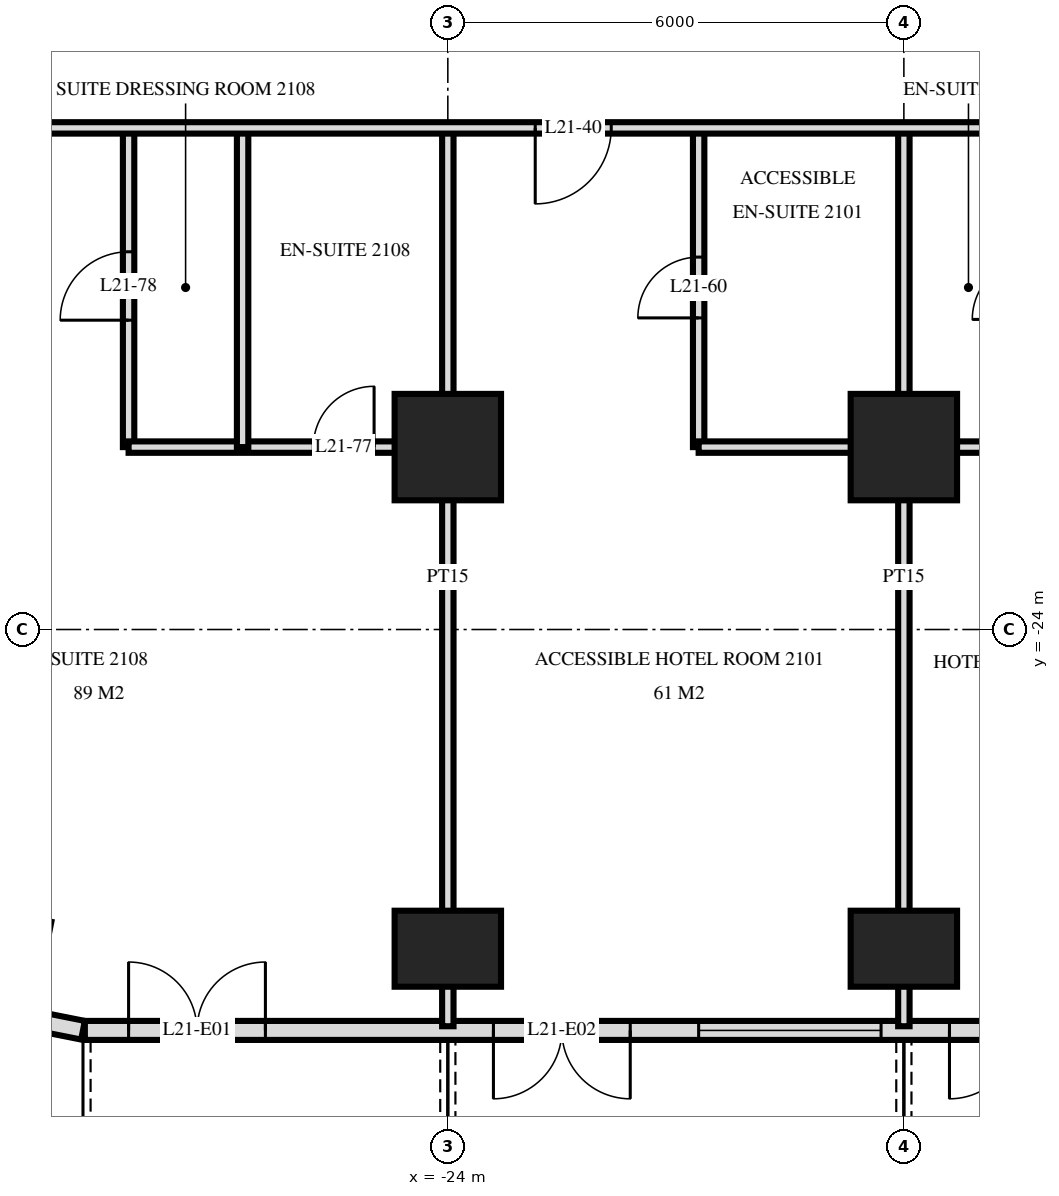
"""IFC4 building model, lengths in metres.
Left out: names, types, materials, properties, quantities, classifications, styles, units other than length and angle.
Written with IfcOpenShell. Run it as: python <this file> out.ifc"""

import sys

from ifc_helpers import new_model, si_unit, direction, frame, frame_2d, origin, origin_2d, place, context, subcontext, project, spatial, rectangle, extrude, element, fill, save


model = new_model("IFC4")
c1 = context("Model", 3, precision=1e-05, world=origin(), true_north=direction((0.0, 1.0)))
c2 = subcontext(c1, "Body", "Model", "MODEL_VIEW")
j1 = project(units=[si_unit("LENGTHUNIT", "METRE"), si_unit("PLANEANGLEUNIT", "RADIAN")], contexts=[c1])
p1 = place(None, origin())
s1 = spatial("IfcSite", under=j1, at=p1, CompositionType="ELEMENT")
p2 = place(p1, origin())
s2 = spatial("IfcBuilding", under=s1, at=p2, CompositionType="ELEMENT")
p3 = place(p2, frame((0.0, 0.0, 85.2)))
s3 = spatial("IfcBuildingStorey", under=s2, at=p3, CompositionType="ELEMENT", Elevation=85.2)
p4 = place(p3, frame((-24.0, -28.2, 0.0), z_axis=(0.0, 0.0, 1.0), x_axis=(1.0, 0.0, 0.0)))
e1 = element("IfcColumn", 1, at=p4, inside=s3, PredefinedType="COLUMN", context=c2, shape_type="SweptSolid", body=[
    extrude(rectangle(XDim=1.4, YDim=1.0, at=origin_2d()), origin(), (0.0, 0.0, 1.0), 3.6),
])
p5 = place(p3, frame((-24.0, -21.6, 0.0), z_axis=(0.0, 0.0, 1.0), x_axis=(1.0, 0.0, 0.0)))
e2 = element("IfcColumn", 2, at=p5, inside=s3, PredefinedType="COLUMN", context=c2, shape_type="SweptSolid", body=[
    extrude(rectangle(XDim=1.4, YDim=1.4, at=origin_2d()), origin(), (0.0, 0.0, 1.0), 3.6),
])
p6 = place(p3, frame((-18.0, -28.2, 0.0), z_axis=(0.0, 0.0, 1.0), x_axis=(1.0, 0.0, 0.0)))
e3 = element("IfcColumn", 3, at=p6, inside=s3, PredefinedType="COLUMN", context=c2, shape_type="SweptSolid", body=[
    extrude(rectangle(XDim=1.4, YDim=1.0, at=origin_2d()), origin(), (0.0, 0.0, 1.0), 3.6),
])
p7 = place(p3, frame((-18.0, -21.6, 0.0), z_axis=(0.0, 0.0, 1.0), x_axis=(1.0, 0.0, 0.0)))
e4 = element("IfcColumn", 4, at=p7, inside=s3, PredefinedType="COLUMN", context=c2, shape_type="SweptSolid", body=[
    extrude(rectangle(XDim=1.4, YDim=1.4, at=origin_2d()), origin(), (0.0, 0.0, 1.0), 3.6),
])
p8 = place(p3, frame((-30.449, -28.945, 0.0), z_axis=(0.0, 0.0, 1.0), x_axis=(0.980775640221, -0.19513878023, 0.0)))
e5 = element("IfcWall", 5, at=p8, inside=s3, PredefinedType="SOLIDWALL", context=c2, shape_type="SweptSolid", body=[
    extrude(rectangle(XDim=1.681, YDim=0.25, at=frame_2d((0.841, 0.0))), origin(), (0.0, 0.0, 1.0), 3.32),
])
p9 = place(p3, frame((-28.775, -29.275, 0.0), z_axis=(0.0, 0.0, 1.0), x_axis=(1.0, 0.0, 0.0)))
e6 = element("IfcWall", 6, at=p9, inside=s3, PredefinedType="SOLIDWALL", context=c2, shape_type="SweptSolid", body=[
    extrude(rectangle(XDim=57.551, YDim=0.25, at=frame_2d((28.775, 0.0))), origin(), (0.0, 0.0, 1.0), 3.32),
])
p10 = place(p9, frame((0.575, 0.0, 0.0)))
e7 = element("IfcOpeningElement", 7, at=p10, cuts=e6, PredefinedType="OPENING", context=c2, shape_type="SweptSolid", body=[
    extrude(rectangle(XDim=1.8, YDim=2.4, at=frame_2d((0.9, 1.2))), frame((0.0, 0.135, 0.0), z_axis=(0.0, -1.0, 0.0), x_axis=(1.0, 0.0, 0.0)), (0.0, 0.0, 1.0), 0.27),
])
p11 = place(p9, frame((5.375, 0.0, 0.0)))
e8 = element("IfcOpeningElement", 8, at=p11, cuts=e6, PredefinedType="OPENING", context=c2, shape_type="SweptSolid", body=[
    extrude(rectangle(XDim=1.8, YDim=2.4, at=frame_2d((0.9, 1.2))), frame((0.0, 0.135, 0.0), z_axis=(0.0, -1.0, 0.0), x_axis=(1.0, 0.0, 0.0)), (0.0, 0.0, 1.0), 0.27),
])
p12 = place(p9, frame((8.075, 0.0, 0.3)))
e9 = element("IfcOpeningElement", 9, at=p12, cuts=e6, PredefinedType="OPENING", context=c2, shape_type="SweptSolid", body=[
    extrude(rectangle(XDim=2.4, YDim=2.1, at=frame_2d((1.2, 1.05))), frame((0.0, 0.135, 0.0), z_axis=(0.0, -1.0, 0.0), x_axis=(1.0, 0.0, 0.0)), (0.0, 0.0, 1.0), 0.27),
])
p13 = place(p9, frame((11.375, 0.0, 0.0)))
e10 = element("IfcOpeningElement", 10, at=p13, cuts=e6, PredefinedType="OPENING", context=c2, shape_type="SweptSolid", body=[
    extrude(rectangle(XDim=1.8, YDim=2.4, at=frame_2d((0.9, 1.2))), frame((0.0, 0.135, 0.0), z_axis=(0.0, -1.0, 0.0), x_axis=(1.0, 0.0, 0.0)), (0.0, 0.0, 1.0), 0.27),
])
p14 = place(p9, frame((14.075, 0.0, 0.3)))
e11 = element("IfcOpeningElement", 11, at=p14, cuts=e6, PredefinedType="OPENING", context=c2, shape_type="SweptSolid", body=[
    extrude(rectangle(XDim=2.4, YDim=2.1, at=frame_2d((1.2, 1.05))), frame((0.0, 0.135, 0.0), z_axis=(0.0, -1.0, 0.0), x_axis=(1.0, 0.0, 0.0)), (0.0, 0.0, 1.0), 0.27),
])
p15 = place(p9, frame((17.075, 0.0, 0.3)))
e12 = element("IfcOpeningElement", 12, at=p15, cuts=e6, PredefinedType="OPENING", context=c2, shape_type="SweptSolid", body=[
    extrude(rectangle(XDim=2.4, YDim=2.1, at=frame_2d((1.2, 1.05))), frame((0.0, 0.135, 0.0), z_axis=(0.0, -1.0, 0.0), x_axis=(1.0, 0.0, 0.0)), (0.0, 0.0, 1.0), 0.27),
])
p16 = place(p9, frame((20.375, 0.0, 0.0)))
e13 = element("IfcOpeningElement", 13, at=p16, cuts=e6, PredefinedType="OPENING", context=c2, shape_type="SweptSolid", body=[
    extrude(rectangle(XDim=1.8, YDim=2.4, at=frame_2d((0.9, 1.2))), frame((0.0, 0.135, 0.0), z_axis=(0.0, -1.0, 0.0), x_axis=(1.0, 0.0, 0.0)), (0.0, 0.0, 1.0), 0.27),
])
p17 = place(p9, frame((23.375, 0.0, 0.0)))
e14 = element("IfcOpeningElement", 14, at=p17, cuts=e6, PredefinedType="OPENING", context=c2, shape_type="SweptSolid", body=[
    extrude(rectangle(XDim=1.8, YDim=2.4, at=frame_2d((0.9, 1.2))), frame((0.0, 0.135, 0.0), z_axis=(0.0, -1.0, 0.0), x_axis=(1.0, 0.0, 0.0)), (0.0, 0.0, 1.0), 0.27),
])
p18 = place(p9, frame((26.075, 0.0, 0.3)))
e15 = element("IfcOpeningElement", 15, at=p18, cuts=e6, PredefinedType="OPENING", context=c2, shape_type="SweptSolid", body=[
    extrude(rectangle(XDim=2.4, YDim=2.1, at=frame_2d((1.2, 1.05))), frame((0.0, 0.135, 0.0), z_axis=(0.0, -1.0, 0.0), x_axis=(1.0, 0.0, 0.0)), (0.0, 0.0, 1.0), 0.27),
])
p19 = place(p9, frame((29.375, 0.0, 0.0)))
e16 = element("IfcOpeningElement", 16, at=p19, cuts=e6, PredefinedType="OPENING", context=c2, shape_type="SweptSolid", body=[
    extrude(rectangle(XDim=1.8, YDim=2.4, at=frame_2d((0.9, 1.2))), frame((0.0, 0.135, 0.0), z_axis=(0.0, -1.0, 0.0), x_axis=(1.0, 0.0, 0.0)), (0.0, 0.0, 1.0), 0.27),
])
p20 = place(p9, frame((32.075, 0.0, 0.3)))
e17 = element("IfcOpeningElement", 17, at=p20, cuts=e6, PredefinedType="OPENING", context=c2, shape_type="SweptSolid", body=[
    extrude(rectangle(XDim=2.4, YDim=2.1, at=frame_2d((1.2, 1.05))), frame((0.0, 0.135, 0.0), z_axis=(0.0, -1.0, 0.0), x_axis=(1.0, 0.0, 0.0)), (0.0, 0.0, 1.0), 0.27),
])
p21 = place(p9, frame((35.375, 0.0, 0.0)))
e18 = element("IfcOpeningElement", 18, at=p21, cuts=e6, PredefinedType="OPENING", context=c2, shape_type="SweptSolid", body=[
    extrude(rectangle(XDim=1.8, YDim=2.4, at=frame_2d((0.9, 1.2))), frame((0.0, 0.135, 0.0), z_axis=(0.0, -1.0, 0.0), x_axis=(1.0, 0.0, 0.0)), (0.0, 0.0, 1.0), 0.27),
])
p22 = place(p9, frame((38.075, 0.0, 0.3)))
e19 = element("IfcOpeningElement", 19, at=p22, cuts=e6, PredefinedType="OPENING", context=c2, shape_type="SweptSolid", body=[
    extrude(rectangle(XDim=2.4, YDim=2.1, at=frame_2d((1.2, 1.05))), frame((0.0, 0.135, 0.0), z_axis=(0.0, -1.0, 0.0), x_axis=(1.0, 0.0, 0.0)), (0.0, 0.0, 1.0), 0.27),
])
p23 = place(p9, frame((41.375, 0.0, 0.0)))
e20 = element("IfcOpeningElement", 20, at=p23, cuts=e6, PredefinedType="OPENING", context=c2, shape_type="SweptSolid", body=[
    extrude(rectangle(XDim=1.8, YDim=2.4, at=frame_2d((0.9, 1.2))), frame((0.0, 0.135, 0.0), z_axis=(0.0, -1.0, 0.0), x_axis=(1.0, 0.0, 0.0)), (0.0, 0.0, 1.0), 0.27),
])
p24 = place(p9, frame((44.075, 0.0, 0.3)))
e21 = element("IfcOpeningElement", 21, at=p24, cuts=e6, PredefinedType="OPENING", context=c2, shape_type="SweptSolid", body=[
    extrude(rectangle(XDim=2.4, YDim=2.1, at=frame_2d((1.2, 1.05))), frame((0.0, 0.135, 0.0), z_axis=(0.0, -1.0, 0.0), x_axis=(1.0, 0.0, 0.0)), (0.0, 0.0, 1.0), 0.27),
])
p25 = place(p9, frame((47.075, 0.0, 0.3)))
e22 = element("IfcOpeningElement", 22, at=p25, cuts=e6, PredefinedType="OPENING", context=c2, shape_type="SweptSolid", body=[
    extrude(rectangle(XDim=2.4, YDim=2.1, at=frame_2d((1.2, 1.05))), frame((0.0, 0.135, 0.0), z_axis=(0.0, -1.0, 0.0), x_axis=(1.0, 0.0, 0.0)), (0.0, 0.0, 1.0), 0.27),
])
p26 = place(p9, frame((50.375, 0.0, 0.0)))
e23 = element("IfcOpeningElement", 23, at=p26, cuts=e6, PredefinedType="OPENING", context=c2, shape_type="SweptSolid", body=[
    extrude(rectangle(XDim=1.8, YDim=2.4, at=frame_2d((0.9, 1.2))), frame((0.0, 0.135, 0.0), z_axis=(0.0, -1.0, 0.0), x_axis=(1.0, 0.0, 0.0)), (0.0, 0.0, 1.0), 0.27),
])
p27 = place(p9, frame((53.375, 0.0, 0.0)))
e24 = element("IfcOpeningElement", 24, at=p27, cuts=e6, PredefinedType="OPENING", context=c2, shape_type="SweptSolid", body=[
    extrude(rectangle(XDim=1.8, YDim=2.4, at=frame_2d((0.9, 1.2))), frame((0.0, 0.135, 0.0), z_axis=(0.0, -1.0, 0.0), x_axis=(1.0, 0.0, 0.0)), (0.0, 0.0, 1.0), 0.27),
])
p28 = place(p3, frame((-18.0, -29.22, 0.0), z_axis=(0.0, 0.0, 1.0), x_axis=(0.0, 1.0, 0.0)))
e25 = element("IfcWall", 25, at=p28, inside=s3, PredefinedType="PARTITIONING", context=c2, shape_type="SweptSolid", body=[
    extrude(rectangle(XDim=11.82, YDim=0.15, at=frame_2d((5.91, 0.0))), origin(), (0.0, 0.0, 1.0), 3.32),
])
p29 = place(p3, frame((-20.7, -21.6, 0.0), z_axis=(0.0, 0.0, 1.0), x_axis=(0.0, 1.0, 0.0)))
e26 = element("IfcWall", 26, at=p29, inside=s3, PredefinedType="PARTITIONING", context=c2, shape_type="SweptSolid", body=[
    extrude(rectangle(XDim=4.2, YDim=0.15, at=frame_2d((2.1, 0.0))), origin(), (0.0, 0.0, 1.0), 3.32),
])
p30 = place(p29, frame((1.7, 0.0, 0.0)))
e27 = element("IfcOpeningElement", 27, at=p30, cuts=e26, PredefinedType="OPENING", context=c2, shape_type="SweptSolid", body=[
    extrude(rectangle(XDim=0.8, YDim=2.1, at=frame_2d((0.4, 1.05))), frame((0.0, 0.085, 0.0), z_axis=(0.0, -1.0, 0.0), x_axis=(1.0, 0.0, 0.0)), (0.0, 0.0, 1.0), 0.17),
])
p31 = place(p3, frame((-24.0, -29.22, 0.0), z_axis=(0.0, 0.0, 1.0), x_axis=(0.0, 1.0, 0.0)))
e28 = element("IfcWall", 28, at=p31, inside=s3, PredefinedType="PARTITIONING", context=c2, shape_type="SweptSolid", body=[
    extrude(rectangle(XDim=11.82, YDim=0.15, at=frame_2d((5.91, 0.0))), origin(), (0.0, 0.0, 1.0), 3.32),
])
p32 = place(p3, frame((-26.7, -21.6, 0.0), z_axis=(0.0, 0.0, 1.0), x_axis=(0.0, 1.0, 0.0)))
e29 = element("IfcWall", 29, at=p32, inside=s3, PredefinedType="PARTITIONING", context=c2, shape_type="SweptSolid", body=[
    extrude(rectangle(XDim=4.2, YDim=0.15, at=frame_2d((2.1, 0.0))), origin(), (0.0, 0.0, 1.0), 3.32),
])
p33 = place(p3, frame((-28.2, -21.6, 0.0), z_axis=(0.0, 0.0, 1.0), x_axis=(0.0, 1.0, 0.0)))
e30 = element("IfcWall", 30, at=p33, inside=s3, PredefinedType="PARTITIONING", context=c2, shape_type="SweptSolid", body=[
    extrude(rectangle(XDim=4.2, YDim=0.15, at=frame_2d((2.1, 0.0))), origin(), (0.0, 0.0, 1.0), 3.32),
])
p34 = place(p33, frame((1.67, 0.0, 0.0)))
e31 = element("IfcOpeningElement", 31, at=p34, cuts=e30, PredefinedType="OPENING", context=c2, shape_type="SweptSolid", body=[
    extrude(rectangle(XDim=0.9, YDim=2.1, at=frame_2d((0.45, 1.05))), frame((0.0, 0.085, 0.0), z_axis=(0.0, -1.0, 0.0), x_axis=(1.0, 0.0, 0.0)), (0.0, 0.0, 1.0), 0.17),
])
p35 = place(p3, frame((-28.2, -21.6, 0.0), z_axis=(0.0, 0.0, 1.0), x_axis=(1.0, 0.0, 0.0)))
e32 = element("IfcWall", 32, at=p35, inside=s3, PredefinedType="PARTITIONING", context=c2, shape_type="SweptSolid", body=[
    extrude(rectangle(XDim=4.2, YDim=0.15, at=frame_2d((2.1, 0.0))), origin(), (0.0, 0.0, 1.0), 3.32),
])
p36 = place(p35, frame((2.43, 0.0, 0.0)))
e33 = element("IfcOpeningElement", 33, at=p36, cuts=e32, PredefinedType="OPENING", context=c2, shape_type="SweptSolid", body=[
    extrude(rectangle(XDim=0.8, YDim=2.1, at=frame_2d((0.4, 1.05))), frame((0.0, 0.085, 0.0), z_axis=(0.0, -1.0, 0.0), x_axis=(1.0, 0.0, 0.0)), (0.0, 0.0, 1.0), 0.17),
])
p37 = place(p3, frame((-20.7, -21.6, 0.0), z_axis=(0.0, 0.0, 1.0), x_axis=(1.0, 0.0, 0.0)))
e34 = element("IfcWall", 34, at=p37, inside=s3, PredefinedType="PARTITIONING", context=c2, shape_type="SweptSolid", body=[
    extrude(rectangle(XDim=4.4, YDim=0.15, at=frame_2d((2.2, 0.0))), origin(), (0.0, 0.0, 1.0), 3.32),
])
p38 = place(p3, frame((-33.12, -17.4, 0.0), z_axis=(0.0, 0.0, 1.0), x_axis=(1.0, 0.0, 0.0)))
e35 = element("IfcWall", 35, at=p38, inside=s3, PredefinedType="PARTITIONING", context=c2, shape_type="SweptSolid", body=[
    extrude(rectangle(XDim=66.24, YDim=0.15, at=frame_2d((33.12, 0.0))), origin(), (0.0, 0.0, 1.0), 3.32),
])
p39 = place(p38, frame((10.27, 0.0, 0.0)))
e36 = element("IfcOpeningElement", 36, at=p39, cuts=e35, PredefinedType="OPENING", context=c2, shape_type="SweptSolid", body=[
    extrude(rectangle(XDim=1.0, YDim=2.1, at=frame_2d((0.5, 1.05))), frame((0.0, 0.085, 0.0), z_axis=(0.0, -1.0, 0.0), x_axis=(1.0, 0.0, 0.0)), (0.0, 0.0, 1.0), 0.17),
])
p40 = place(p38, frame((16.97, 0.0, 0.0)))
e37 = element("IfcOpeningElement", 37, at=p40, cuts=e35, PredefinedType="OPENING", context=c2, shape_type="SweptSolid", body=[
    extrude(rectangle(XDim=1.0, YDim=2.1, at=frame_2d((0.5, 1.05))), frame((0.0, 0.085, 0.0), z_axis=(0.0, -1.0, 0.0), x_axis=(1.0, 0.0, 0.0)), (0.0, 0.0, 1.0), 0.17),
])
p41 = place(p38, frame((28.42, 0.0, 0.0)))
e38 = element("IfcOpeningElement", 38, at=p41, cuts=e35, PredefinedType="OPENING", context=c2, shape_type="SweptSolid", body=[
    extrude(rectangle(XDim=1.0, YDim=2.1, at=frame_2d((0.5, 1.05))), frame((0.0, 0.085, 0.0), z_axis=(0.0, -1.0, 0.0), x_axis=(1.0, 0.0, 0.0)), (0.0, 0.0, 1.0), 0.17),
])
p42 = place(p38, frame((30.82, 0.0, 0.0)))
e39 = element("IfcOpeningElement", 39, at=p42, cuts=e35, PredefinedType="OPENING", context=c2, shape_type="SweptSolid", body=[
    extrude(rectangle(XDim=1.0, YDim=2.1, at=frame_2d((0.5, 1.05))), frame((0.0, 0.085, 0.0), z_axis=(0.0, -1.0, 0.0), x_axis=(1.0, 0.0, 0.0)), (0.0, 0.0, 1.0), 0.17),
])
p43 = place(p38, frame((39.27, 0.0, 0.0)))
e40 = element("IfcOpeningElement", 40, at=p43, cuts=e35, PredefinedType="OPENING", context=c2, shape_type="SweptSolid", body=[
    extrude(rectangle(XDim=1.0, YDim=2.1, at=frame_2d((0.5, 1.05))), frame((0.0, 0.085, 0.0), z_axis=(0.0, -1.0, 0.0), x_axis=(1.0, 0.0, 0.0)), (0.0, 0.0, 1.0), 0.17),
])
p44 = place(p38, frame((45.22, 0.0, 0.0)))
e41 = element("IfcOpeningElement", 41, at=p44, cuts=e35, PredefinedType="OPENING", context=c2, shape_type="SweptSolid", body=[
    extrude(rectangle(XDim=1.0, YDim=2.1, at=frame_2d((0.5, 1.05))), frame((0.0, 0.085, 0.0), z_axis=(0.0, -1.0, 0.0), x_axis=(1.0, 0.0, 0.0)), (0.0, 0.0, 1.0), 0.17),
])
p45 = place(p38, frame((48.27, 0.0, 0.0)))
e42 = element("IfcOpeningElement", 42, at=p45, cuts=e35, PredefinedType="OPENING", context=c2, shape_type="SweptSolid", body=[
    extrude(rectangle(XDim=1.0, YDim=2.1, at=frame_2d((0.5, 1.05))), frame((0.0, 0.085, 0.0), z_axis=(0.0, -1.0, 0.0), x_axis=(1.0, 0.0, 0.0)), (0.0, 0.0, 1.0), 0.17),
])
p46 = place(p38, frame((1.87, 0.0, 0.0)))
e43 = element("IfcOpeningElement", 43, at=p46, cuts=e35, PredefinedType="OPENING", context=c2, shape_type="SweptSolid", body=[
    extrude(rectangle(XDim=1.0, YDim=2.1, at=frame_2d((0.5, 1.05))), frame((0.0, 0.085, 0.0), z_axis=(0.0, -1.0, 0.0), x_axis=(1.0, 0.0, 0.0)), (0.0, 0.0, 1.0), 0.17),
])
p47 = place(p38, frame((60.37, 0.0, 0.0)))
e44 = element("IfcOpeningElement", 44, at=p47, cuts=e35, PredefinedType="OPENING", context=c2, shape_type="SweptSolid", body=[
    extrude(rectangle(XDim=1.0, YDim=2.1, at=frame_2d((0.5, 1.05))), frame((0.0, 0.085, 0.0), z_axis=(0.0, -1.0, 0.0), x_axis=(1.0, 0.0, 0.0)), (0.0, 0.0, 1.0), 0.17),
])
p48 = place(p10, origin())
e45 = element("IfcDoor", 45, at=p48, inside=s3, OperationType="DOUBLE_DOOR_SINGLE_SWING", PredefinedType="DOOR", context=c2, shape_type="SweptSolid", body=[
    extrude(rectangle(XDim=1.8, YDim=2.4, at=frame_2d((0.9, 1.2))), frame((0.0, 0.025, 0.0), z_axis=(0.0, -1.0, 0.0), x_axis=(1.0, 0.0, 0.0)), (0.0, 0.0, 1.0), 0.05),
])
fill(e7, e45)
p49 = place(p11, frame((0.9, 0.0, 0.0), z_axis=(0.0, 0.0, 1.0), x_axis=(-1.0, 0.0, 0.0)))
e46 = element("IfcDoor", 46, at=p49, inside=s3, OperationType="DOUBLE_DOOR_SINGLE_SWING", PredefinedType="DOOR", context=c2, shape_type="SweptSolid", body=[
    extrude(rectangle(XDim=1.8, YDim=2.4, at=frame_2d((0.0, 1.2))), frame((0.0, -0.025, 0.0), z_axis=(0.0, 1.0, 0.0), x_axis=(-1.0, 0.0, 0.0)), (0.0, 0.0, 1.0), 0.05),
])
fill(e8, e46)
p50 = place(p12, origin())
e47 = element("IfcWindow", 47, at=p50, inside=s3, PartitioningType="SINGLE_PANEL", PredefinedType="WINDOW", context=c2, shape_type="SweptSolid", body=[
    extrude(rectangle(XDim=2.4, YDim=2.1, at=frame_2d((1.2, 1.05))), frame((0.0, 0.03, 0.0), z_axis=(0.0, -1.0, 0.0), x_axis=(1.0, 0.0, 0.0)), (0.0, 0.0, 1.0), 0.06),
])
fill(e9, e47)
p51 = place(p13, frame((0.9, 0.0, 0.0), z_axis=(0.0, 0.0, 1.0), x_axis=(-1.0, 0.0, 0.0)))
e48 = element("IfcDoor", 48, at=p51, inside=s3, OperationType="DOUBLE_DOOR_SINGLE_SWING", PredefinedType="DOOR", context=c2, shape_type="SweptSolid", body=[
    extrude(rectangle(XDim=1.8, YDim=2.4, at=frame_2d((0.0, 1.2))), frame((0.0, -0.025, 0.0), z_axis=(0.0, 1.0, 0.0), x_axis=(-1.0, 0.0, 0.0)), (0.0, 0.0, 1.0), 0.05),
])
fill(e10, e48)
p52 = place(p39, frame((0.5, 0.0, 0.0), z_axis=(0.0, 0.0, 1.0), x_axis=(-1.0, 0.0, 0.0)))
e49 = element("IfcDoor", 49, at=p52, inside=s3, OperationType="SINGLE_SWING_LEFT", PredefinedType="DOOR", context=c2, shape_type="SweptSolid", body=[
    extrude(rectangle(XDim=1.0, YDim=2.1, at=frame_2d((0.0, 1.05))), frame((0.0, -0.025, 0.0), z_axis=(0.0, 1.0, 0.0), x_axis=(-1.0, 0.0, 0.0)), (0.0, 0.0, 1.0), 0.05),
])
fill(e36, e49)
p53 = place(p30, origin())
e50 = element("IfcDoor", 50, at=p53, inside=s3, OperationType="SINGLE_SWING_RIGHT", PredefinedType="DOOR", context=c2, shape_type="SweptSolid", body=[
    extrude(rectangle(XDim=0.8, YDim=2.1, at=frame_2d((0.4, 1.05))), frame((0.0, 0.025, 0.0), z_axis=(0.0, -1.0, 0.0), x_axis=(1.0, 0.0, 0.0)), (0.0, 0.0, 1.0), 0.05),
])
fill(e27, e50)
p54 = place(p36, origin())
e51 = element("IfcDoor", 51, at=p54, inside=s3, OperationType="SINGLE_SWING_LEFT", PredefinedType="DOOR", context=c2, shape_type="SweptSolid", body=[
    extrude(rectangle(XDim=0.8, YDim=2.1, at=frame_2d((0.4, 1.05))), frame((0.0, 0.025, 0.0), z_axis=(0.0, -1.0, 0.0), x_axis=(1.0, 0.0, 0.0)), (0.0, 0.0, 1.0), 0.05),
])
fill(e33, e51)
p55 = place(p34, origin())
e52 = element("IfcDoor", 52, at=p55, inside=s3, OperationType="SINGLE_SWING_RIGHT", PredefinedType="DOOR", context=c2, shape_type="SweptSolid", body=[
    extrude(rectangle(XDim=0.9, YDim=2.1, at=frame_2d((0.45, 1.05))), frame((0.0, 0.025, 0.0), z_axis=(0.0, -1.0, 0.0), x_axis=(1.0, 0.0, 0.0)), (0.0, 0.0, 1.0), 0.05),
])
fill(e31, e52)
save(model, sys.argv[1])
